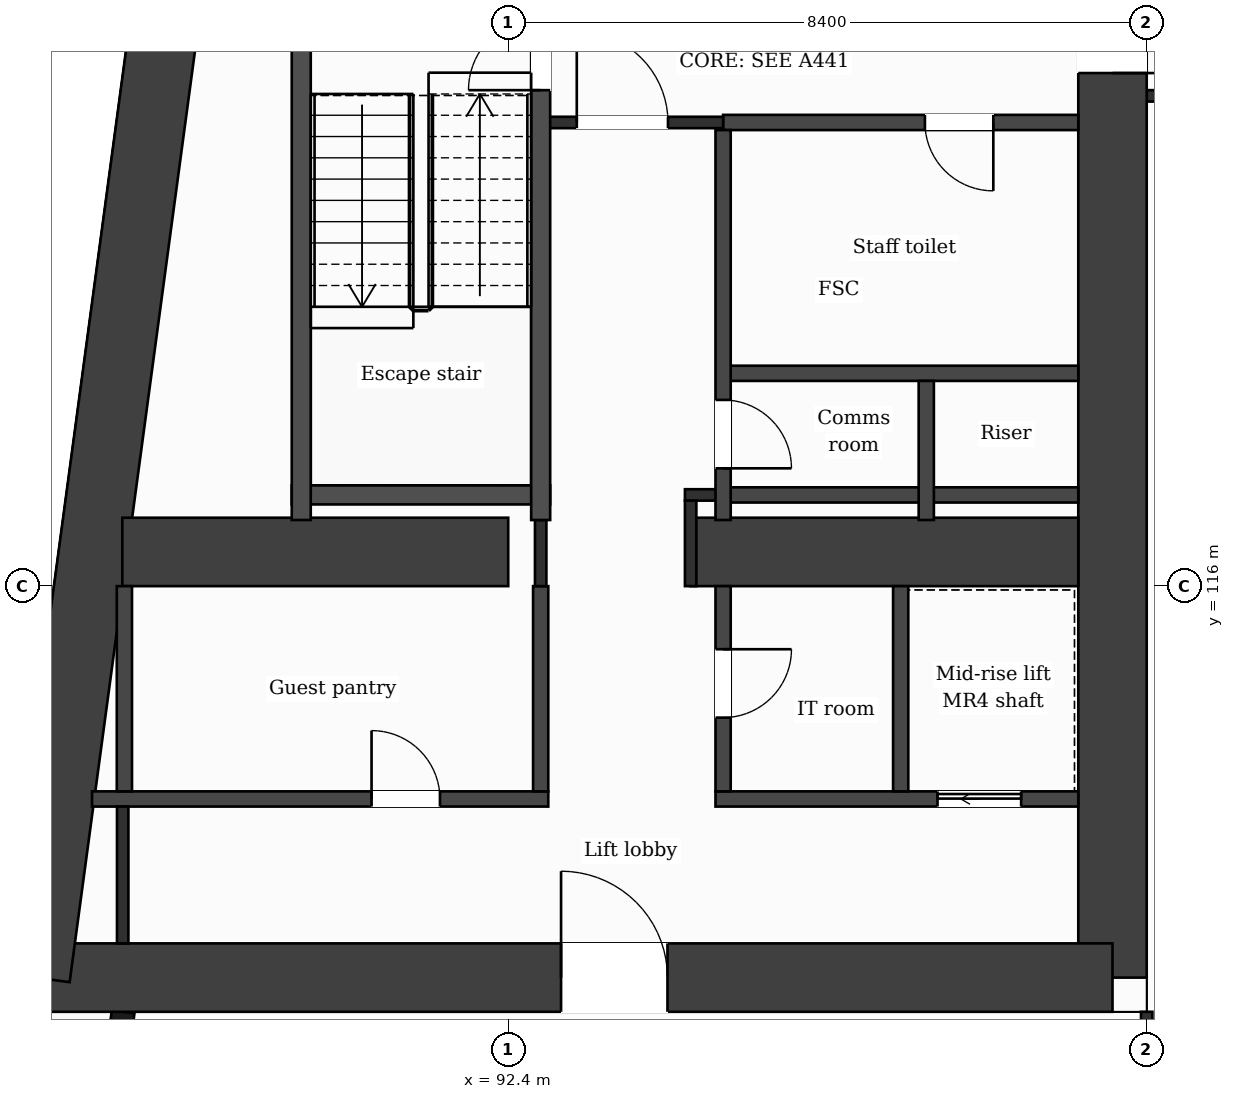
"""IFC4 building model, lengths in metres.
Left out: names, types, materials, properties, quantities, classifications, styles, units other than length and angle.
Written with IfcOpenShell. Run it as: python <this file> out.ifc"""

import sys

from ifc_helpers import new_model, si_unit, direction, frame, frame_2d, origin, place, context, subcontext, project, spatial, rectangle, extrude, element, fill, save


model = new_model("IFC4")
c1 = context("Model", 3, precision=1e-05, world=origin(), true_north=direction((0.0, 1.0)))
c2 = subcontext(c1, "Body", "Model", "MODEL_VIEW")
j1 = project(units=[si_unit("LENGTHUNIT", "METRE"), si_unit("PLANEANGLEUNIT", "RADIAN")], contexts=[c1])
p1 = place(None, origin())
s1 = spatial("IfcSite", under=j1, at=p1, CompositionType="ELEMENT")
p2 = place(p1, origin())
s2 = spatial("IfcBuilding", under=s1, at=p2, CompositionType="ELEMENT")
p3 = place(p2, frame((0.0, 0.0, 170.0)))
s3 = spatial("IfcBuildingStorey", under=s2, at=p3, CompositionType="ELEMENT", Elevation=170.0)
p4 = place(p3, frame((100.35, 131.95, 0.0), z_axis=(0.0, 0.0, 1.0), x_axis=(0.0, -1.0, 0.0)))
e1 = element("IfcWall", 1, at=p4, inside=s3, PredefinedType="SHEAR", context=c2, shape_type="SweptSolid", body=[
    extrude(rectangle(XDim=21.1, YDim=0.9, at=frame_2d((10.55, 0.0))), origin(), (0.0, 0.0, 1.0), 3.7),
])
p5 = place(p4, frame((7.8, 0.0, 0.0)))
e2 = element("IfcOpeningElement", 2, at=p5, cuts=e1, PredefinedType="OPENING", context=c2, shape_type="SweptSolid", body=[
    extrude(rectangle(XDim=1.4, YDim=2.1, at=frame_2d((0.7, 1.05))), frame((0.0, 0.46, 0.0), z_axis=(0.0, -1.0, 0.0), x_axis=(1.0, 0.0, 0.0)), (0.0, 0.0, 1.0), 0.92),
])
p6 = place(p3, frame((100.35, 110.85, 0.0), z_axis=(0.0, 0.0, 1.0), x_axis=(-1.0, 0.0, 0.0)))
e3 = element("IfcWall", 3, at=p6, inside=s3, PredefinedType="SHEAR", context=c2, shape_type="SweptSolid", body=[
    extrude(rectangle(XDim=14.166, YDim=0.9, at=frame_2d((7.083, 0.0))), origin(), (0.0, 0.0, 1.0), 3.7),
])
p7 = place(p6, frame((5.855, 0.0, 0.0)))
e4 = element("IfcOpeningElement", 4, at=p7, cuts=e3, PredefinedType="OPENING", context=c2, shape_type="SweptSolid", body=[
    extrude(rectangle(XDim=1.4, YDim=2.1, at=frame_2d((0.7, 1.05))), frame((0.0, 0.46, 0.0), z_axis=(0.0, -1.0, 0.0), x_axis=(1.0, 0.0, 0.0)), (0.0, 0.0, 1.0), 0.92),
])
p8 = place(p3, frame((86.184, 110.85, 0.0), z_axis=(0.0, 0.0, 1.0), x_axis=(0.133410495943, 0.991060865725, 0.0)))
e5 = element("IfcWall", 5, at=p8, inside=s3, PredefinedType="SHEAR", context=c2, shape_type="SweptSolid", body=[
    extrude(rectangle(XDim=21.29, YDim=0.9, at=frame_2d((10.645, 0.0))), origin(), (0.0, 0.0, 1.0), 3.7),
])
p9 = place(p3, frame((87.323, 116.45, 0.0), z_axis=(0.0, 0.0, 1.0), x_axis=(1.0, 0.0, 0.0)))
e6 = element("IfcWall", 6, at=p9, inside=s3, PredefinedType="SHEAR", context=c2, shape_type="SweptSolid", body=[
    extrude(rectangle(XDim=5.077, YDim=0.9, at=frame_2d((2.539, 0.0))), origin(), (0.0, 0.0, 1.0), 3.7),
])
p10 = place(p3, frame((94.8, 116.45, 0.0), z_axis=(0.0, 0.0, 1.0), x_axis=(1.0, 0.0, 0.0)))
e7 = element("IfcWall", 7, at=p10, inside=s3, PredefinedType="SHEAR", context=c2, shape_type="SweptSolid", body=[
    extrude(rectangle(XDim=5.1, YDim=0.9, at=frame_2d((2.55, 0.0))), origin(), (0.0, 0.0, 1.0), 3.7),
])
p11 = place(p3, frame((87.334, 110.4, 0.0), z_axis=(0.0, 0.0, 1.0), x_axis=(-0.133437175554, -0.991057273915, 0.0)))
e8 = element("IfcWall", 8, at=p11, inside=s3, PredefinedType="SOLIDWALL", context=c2, shape_type="SweptSolid", body=[
    extrude(rectangle(XDim=6.781, YDim=0.3, at=frame_2d((3.39, 0.0))), origin(), (0.0, 0.0, 1.0), 3.38),
])
p12 = place(p11, frame((1.418, 0.0, 0.0)))
e9 = element("IfcOpeningElement", 9, at=p12, cuts=e8, PredefinedType="OPENING", context=c2, shape_type="SweptSolid", body=[
    extrude(rectangle(XDim=1.2, YDim=2.4, at=frame_2d((0.6, 1.2))), frame((0.0, 0.16, 0.0), z_axis=(0.0, -1.0, 0.0), x_axis=(1.0, 0.0, 0.0)), (0.0, 0.0, 1.0), 0.32),
])
p13 = place(p11, frame((4.758, 0.0, 0.9)))
e10 = element("IfcOpeningElement", 10, at=p13, cuts=e8, PredefinedType="OPENING", context=c2, shape_type="SweptSolid", body=[
    extrude(rectangle(XDim=1.2, YDim=2.1, at=frame_2d((0.6, 1.05))), frame((0.0, 0.16, 0.0), z_axis=(0.0, -1.0, 0.0), x_axis=(1.0, 0.0, 0.0)), (0.0, 0.0, 1.0), 0.32),
])
p14 = place(p3, frame((86.924, 113.2, 0.0), z_axis=(0.0, 0.0, 1.0), x_axis=(1.0, 0.0, 0.0)))
e11 = element("IfcWall", 11, at=p14, inside=s3, PredefinedType="PARTITIONING", context=c2, shape_type="SweptSolid", body=[
    extrude(rectangle(XDim=6.003, YDim=0.2, at=frame_2d((3.001, 0.0))), origin(), (0.0, 0.0, 1.0), 3.38),
])
p15 = place(p14, frame((3.678, 0.0, 0.0)))
e12 = element("IfcOpeningElement", 12, at=p15, cuts=e11, PredefinedType="OPENING", context=c2, shape_type="SweptSolid", body=[
    extrude(rectangle(XDim=0.9, YDim=2.1, at=frame_2d((0.45, 1.05))), frame((0.0, 0.11, 0.0), z_axis=(0.0, -1.0, 0.0), x_axis=(1.0, 0.0, 0.0)), (0.0, 0.0, 1.0), 0.22),
])
p16 = place(p3, frame((95.127, 113.2, 0.0), z_axis=(0.0, 0.0, 1.0), x_axis=(1.0, 0.0, 0.0)))
e13 = element("IfcWall", 13, at=p16, inside=s3, PredefinedType="PARTITIONING", context=c2, shape_type="SweptSolid", body=[
    extrude(rectangle(XDim=4.773, YDim=0.2, at=frame_2d((2.386, 0.0))), origin(), (0.0, 0.0, 1.0), 3.38),
])
p17 = place(p16, frame((2.921, 0.0, 0.0)))
e14 = element("IfcOpeningElement", 14, at=p17, cuts=e13, PredefinedType="OPENING", context=c2, shape_type="SweptSolid", body=[
    extrude(rectangle(XDim=1.1, YDim=2.1, at=frame_2d((0.55, 1.05))), frame((0.0, 0.11, 0.0), z_axis=(0.0, -1.0, 0.0), x_axis=(1.0, 0.0, 0.0)), (0.0, 0.0, 1.0), 0.22),
])
p18 = place(p3, frame((95.227, 117.2, 0.0), z_axis=(0.0, 0.0, 1.0), x_axis=(1.0, 0.0, 0.0)))
e15 = element("IfcWall", 15, at=p18, inside=s3, PredefinedType="PARTITIONING", context=c2, shape_type="SweptSolid", body=[
    extrude(rectangle(XDim=4.673, YDim=0.2, at=frame_2d((2.336, 0.0))), origin(), (0.0, 0.0, 1.0), 3.38),
])
p19 = place(p3, frame((94.725, 117.2, 0.0), z_axis=(0.0, 0.0, 1.0), x_axis=(1.0, 0.0, 0.0)))
e16 = element("IfcWall", 16, at=p19, inside=s3, PredefinedType="PARTITIONING", context=c2, shape_type="SweptSolid", body=[
    extrude(rectangle(XDim=0.502, YDim=0.15, at=frame_2d((0.251, 0.0))), origin(), (0.0, 0.0, 1.0), 3.38),
])
p20 = place(p3, frame((89.552, 117.2, 0.0), z_axis=(0.0, 0.0, 1.0), x_axis=(1.0, 0.0, 0.0)))
e17 = element("IfcWall", 17, at=p20, inside=s3, PredefinedType="PARTITIONING", context=c2, shape_type="SweptSolid", body=[
    extrude(rectangle(XDim=3.4, YDim=0.25, at=frame_2d((1.7, 0.0))), origin(), (0.0, 0.0, 1.0), 3.38),
])
p21 = place(p3, frame((95.227, 118.8, 0.0), z_axis=(0.0, 0.0, 1.0), x_axis=(1.0, 0.0, 0.0)))
e18 = element("IfcWall", 18, at=p21, inside=s3, PredefinedType="PARTITIONING", context=c2, shape_type="SweptSolid", body=[
    extrude(rectangle(XDim=4.673, YDim=0.2, at=frame_2d((2.336, 0.0))), origin(), (0.0, 0.0, 1.0), 3.38),
])
p22 = place(p3, frame((95.227, 122.1, 0.0), z_axis=(0.0, 0.0, 1.0), x_axis=(1.0, 0.0, 0.0)))
e19 = element("IfcWall", 19, at=p22, inside=s3, PredefinedType="PARTITIONING", context=c2, shape_type="SweptSolid", body=[
    extrude(rectangle(XDim=4.673, YDim=0.2, at=frame_2d((2.336, 0.0))), origin(), (0.0, 0.0, 1.0), 3.38),
])
p23 = place(p22, frame((2.655, 0.0, 0.0)))
e20 = element("IfcOpeningElement", 20, at=p23, cuts=e19, PredefinedType="OPENING", context=c2, shape_type="SweptSolid", body=[
    extrude(rectangle(XDim=0.9, YDim=2.1, at=frame_2d((0.45, 1.05))), frame((0.0, 0.11, 0.0), z_axis=(0.0, -1.0, 0.0), x_axis=(1.0, 0.0, 0.0)), (0.0, 0.0, 1.0), 0.22),
])
p24 = place(p3, frame((92.827, 122.1, 0.0), z_axis=(0.0, 0.0, 1.0), x_axis=(1.0, 0.0, 0.0)))
e21 = element("IfcWall", 21, at=p24, inside=s3, PredefinedType="PARTITIONING", context=c2, shape_type="SweptSolid", body=[
    extrude(rectangle(XDim=2.4, YDim=0.15, at=frame_2d((1.2, 0.0))), origin(), (0.0, 0.0, 1.0), 3.38),
])
p25 = place(p24, frame((0.475, 0.0, 0.0)))
e22 = element("IfcOpeningElement", 22, at=p25, cuts=e21, PredefinedType="OPENING", context=c2, shape_type="SweptSolid", body=[
    extrude(rectangle(XDim=1.2, YDim=2.1, at=frame_2d((0.6, 1.05))), frame((0.0, 0.085, 0.0), z_axis=(0.0, -1.0, 0.0), x_axis=(1.0, 0.0, 0.0)), (0.0, 0.0, 1.0), 0.17),
])
p26 = place(p3, frame((100.8, 122.45, 0.0), z_axis=(0.0, 0.0, 1.0), x_axis=(1.0, 0.0, 0.0)))
e23 = element("IfcWall", 23, at=p26, inside=s3, PredefinedType="PARTITIONING", context=c2, shape_type="SweptSolid", body=[
    extrude(rectangle(XDim=25.2, YDim=0.15, at=frame_2d((12.6, 0.0))), origin(), (0.0, 0.0, 1.0), 3.38),
])
p27 = place(p3, frame((87.35, 113.3, 0.0), z_axis=(0.0, 0.0, 1.0), x_axis=(0.0, 1.0, 0.0)))
e24 = element("IfcWall", 24, at=p27, inside=s3, PredefinedType="PARTITIONING", context=c2, shape_type="SweptSolid", body=[
    extrude(rectangle(XDim=2.7, YDim=0.2, at=frame_2d((1.35, 0.0))), origin(), (0.0, 0.0, 1.0), 3.38),
])
p28 = place(p3, frame((87.328, 111.3, 0.0), z_axis=(0.0, 0.0, 1.0), x_axis=(0.0, 1.0, 0.0)))
e25 = element("IfcWall", 25, at=p28, inside=s3, PredefinedType="PARTITIONING", context=c2, shape_type="SweptSolid", body=[
    extrude(rectangle(XDim=1.8, YDim=0.15, at=frame_2d((0.9, 0.0))), origin(), (0.0, 0.0, 1.0), 3.38),
])
p29 = place(p3, frame((89.677, 116.87, 0.0), z_axis=(0.0, 0.0, 1.0), x_axis=(0.0, 1.0, 0.0)))
e26 = element("IfcWall", 26, at=p29, inside=s3, PredefinedType="PARTITIONING", context=c2, shape_type="SweptSolid", body=[
    extrude(rectangle(XDim=6.955, YDim=0.25, at=frame_2d((3.478, 0.0))), origin(), (0.0, 0.0, 1.0), 3.38),
])
p30 = place(p3, frame((92.827, 113.3, 0.0), z_axis=(0.0, 0.0, 1.0), x_axis=(0.0, 1.0, 0.0)))
e27 = element("IfcWall", 27, at=p30, inside=s3, PredefinedType="PARTITIONING", context=c2, shape_type="SweptSolid", body=[
    extrude(rectangle(XDim=2.7, YDim=0.2, at=frame_2d((1.35, 0.0))), origin(), (0.0, 0.0, 1.0), 3.38),
])
p31 = place(p3, frame((92.827, 116.0, 0.0), z_axis=(0.0, 0.0, 1.0), x_axis=(0.0, 1.0, 0.0)))
e28 = element("IfcWall", 28, at=p31, inside=s3, PredefinedType="PARTITIONING", context=c2, shape_type="SweptSolid", body=[
    extrude(rectangle(XDim=0.87, YDim=0.15, at=frame_2d((0.435, 0.0))), origin(), (0.0, 0.0, 1.0), 3.38),
])
p32 = place(p3, frame((92.827, 116.87, 0.0), z_axis=(0.0, 0.0, 1.0), x_axis=(0.0, 1.0, 0.0)))
e29 = element("IfcWall", 29, at=p32, inside=s3, PredefinedType="PARTITIONING", context=c2, shape_type="SweptSolid", body=[
    extrude(rectangle(XDim=6.955, YDim=0.25, at=frame_2d((3.478, 0.0))), origin(), (0.0, 0.0, 1.0), 3.38),
])
p33 = place(p32, frame((5.655, 0.0, 0.0)))
e30 = element("IfcOpeningElement", 30, at=p33, cuts=e29, PredefinedType="OPENING", context=c2, shape_type="SweptSolid", body=[
    extrude(rectangle(XDim=0.95, YDim=2.1, at=frame_2d((0.475, 1.05))), frame((0.0, 0.135, 0.0), z_axis=(0.0, -1.0, 0.0), x_axis=(1.0, 0.0, 0.0)), (0.0, 0.0, 1.0), 0.27),
])
p34 = place(p3, frame((94.8, 116.0, 0.0), z_axis=(0.0, 0.0, 1.0), x_axis=(0.0, 1.0, 0.0)))
e31 = element("IfcWall", 31, at=p34, inside=s3, PredefinedType="PARTITIONING", context=c2, shape_type="SweptSolid", body=[
    extrude(rectangle(XDim=1.125, YDim=0.15, at=frame_2d((0.562, 0.0))), origin(), (0.0, 0.0, 1.0), 3.38),
])
p35 = place(p3, frame((95.227, 113.3, 0.0), z_axis=(0.0, 0.0, 1.0), x_axis=(0.0, 1.0, 0.0)))
e32 = element("IfcWall", 32, at=p35, inside=s3, PredefinedType="PARTITIONING", context=c2, shape_type="SweptSolid", body=[
    extrude(rectangle(XDim=2.7, YDim=0.2, at=frame_2d((1.35, 0.0))), origin(), (0.0, 0.0, 1.0), 3.38),
])
p36 = place(p35, frame((0.97, 0.0, 0.0)))
e33 = element("IfcOpeningElement", 33, at=p36, cuts=e32, PredefinedType="OPENING", context=c2, shape_type="SweptSolid", body=[
    extrude(rectangle(XDim=0.9, YDim=2.1, at=frame_2d((0.45, 1.05))), frame((0.0, 0.11, 0.0), z_axis=(0.0, -1.0, 0.0), x_axis=(1.0, 0.0, 0.0)), (0.0, 0.0, 1.0), 0.22),
])
p37 = place(p3, frame((95.227, 116.87, 0.0), z_axis=(0.0, 0.0, 1.0), x_axis=(0.0, 1.0, 0.0)))
e34 = element("IfcWall", 34, at=p37, inside=s3, PredefinedType="PARTITIONING", context=c2, shape_type="SweptSolid", body=[
    extrude(rectangle(XDim=5.13, YDim=0.2, at=frame_2d((2.565, 0.0))), origin(), (0.0, 0.0, 1.0), 3.38),
])
p38 = place(p37, frame((0.68, 0.0, 0.0)))
e35 = element("IfcOpeningElement", 35, at=p38, cuts=e34, PredefinedType="OPENING", context=c2, shape_type="SweptSolid", body=[
    extrude(rectangle(XDim=0.9, YDim=2.1, at=frame_2d((0.45, 1.05))), frame((0.0, 0.11, 0.0), z_axis=(0.0, -1.0, 0.0), x_axis=(1.0, 0.0, 0.0)), (0.0, 0.0, 1.0), 0.22),
])
p39 = place(p3, frame((97.563, 113.3, 0.0), z_axis=(0.0, 0.0, 1.0), x_axis=(0.0, 1.0, 0.0)))
e36 = element("IfcWall", 36, at=p39, inside=s3, PredefinedType="PARTITIONING", context=c2, shape_type="SweptSolid", body=[
    extrude(rectangle(XDim=2.7, YDim=0.2, at=frame_2d((1.35, 0.0))), origin(), (0.0, 0.0, 1.0), 3.38),
])
p40 = place(p3, frame((97.9, 116.87, 0.0), z_axis=(0.0, 0.0, 1.0), x_axis=(0.0, 1.0, 0.0)))
e37 = element("IfcWall", 37, at=p40, inside=s3, PredefinedType="PARTITIONING", context=c2, shape_type="SweptSolid", body=[
    extrude(rectangle(XDim=1.83, YDim=0.2, at=frame_2d((0.915, 0.0))), origin(), (0.0, 0.0, 1.0), 3.38),
])
p41 = place(p3, frame((100.8, 109.075, 0.0), z_axis=(0.0, 0.0, 1.0), x_axis=(0.0, 1.0, 0.0)))
e38 = element("IfcWall", 38, at=p41, inside=s3, PredefinedType="PARTITIONING", context=c2, shape_type="SweptSolid", body=[
    extrude(rectangle(XDim=1.325, YDim=0.15, at=frame_2d((0.663, 0.0))), origin(), (0.0, 0.0, 1.0), 3.38),
])
p42 = place(p25, origin())
e39 = element("IfcDoor", 39, at=p42, inside=s3, OperationType="SINGLE_SWING_LEFT", PredefinedType="DOOR", context=c2, shape_type="SweptSolid", body=[
    extrude(rectangle(XDim=1.2, YDim=2.1, at=frame_2d((0.6, 1.05))), frame((0.0, 0.025, 0.0), z_axis=(0.0, -1.0, 0.0), x_axis=(1.0, 0.0, 0.0)), (0.0, 0.0, 1.0), 0.05),
])
fill(e22, e39)
p43 = place(p23, origin())
e40 = element("IfcDoor", 40, at=p43, inside=s3, OperationType="SINGLE_SWING_RIGHT", PredefinedType="DOOR", context=c2, shape_type="SweptSolid", body=[
    extrude(rectangle(XDim=0.9, YDim=2.1, at=frame_2d((0.45, 1.05))), frame((0.0, 0.025, 0.0), z_axis=(0.0, -1.0, 0.0), x_axis=(1.0, 0.0, 0.0)), (0.0, 0.0, 1.0), 0.05),
])
fill(e20, e40)
p44 = place(p33, origin())
e41 = element("IfcDoor", 41, at=p44, inside=s3, OperationType="SINGLE_SWING_LEFT", PredefinedType="DOOR", context=c2, shape_type="SweptSolid", body=[
    extrude(rectangle(XDim=0.95, YDim=2.1, at=frame_2d((0.475, 1.05))), frame((0.0, 0.025, 0.0), z_axis=(0.0, -1.0, 0.0), x_axis=(1.0, 0.0, 0.0)), (0.0, 0.0, 1.0), 0.05),
])
fill(e30, e41)
p45 = place(p38, origin())
e42 = element("IfcDoor", 42, at=p45, inside=s3, OperationType="SINGLE_SWING_LEFT", PredefinedType="DOOR", context=c2, shape_type="SweptSolid", body=[
    extrude(rectangle(XDim=0.9, YDim=2.1, at=frame_2d((0.45, 1.05))), frame((0.0, 0.025, 0.0), z_axis=(0.0, -1.0, 0.0), x_axis=(1.0, 0.0, 0.0)), (0.0, 0.0, 1.0), 0.05),
])
fill(e35, e42)
p46 = place(p17, origin())
e43 = element("IfcDoor", 43, at=p46, inside=s3, OperationType="SLIDING_TO_LEFT", PredefinedType="DOOR", context=c2, shape_type="SweptSolid", body=[
    extrude(rectangle(XDim=1.1, YDim=2.1, at=frame_2d((0.55, 1.05))), frame((0.0, 0.025, 0.0), z_axis=(0.0, -1.0, 0.0), x_axis=(1.0, 0.0, 0.0)), (0.0, 0.0, 1.0), 0.05),
])
fill(e14, e43)
p47 = place(p15, origin())
e44 = element("IfcDoor", 44, at=p47, inside=s3, OperationType="SINGLE_SWING_LEFT", PredefinedType="DOOR", context=c2, shape_type="SweptSolid", body=[
    extrude(rectangle(XDim=0.9, YDim=2.1, at=frame_2d((0.45, 1.05))), frame((0.0, 0.025, 0.0), z_axis=(0.0, -1.0, 0.0), x_axis=(1.0, 0.0, 0.0)), (0.0, 0.0, 1.0), 0.05),
])
fill(e12, e44)
p48 = place(p36, origin())
e45 = element("IfcDoor", 45, at=p48, inside=s3, OperationType="SINGLE_SWING_RIGHT", PredefinedType="DOOR", context=c2, shape_type="SweptSolid", body=[
    extrude(rectangle(XDim=0.9, YDim=2.1, at=frame_2d((0.45, 1.05))), frame((0.0, 0.025, 0.0), z_axis=(0.0, -1.0, 0.0), x_axis=(1.0, 0.0, 0.0)), (0.0, 0.0, 1.0), 0.05),
])
fill(e33, e45)
p49 = place(p7, origin())
e46 = element("IfcDoor", 46, at=p49, inside=s3, OperationType="SINGLE_SWING_RIGHT", PredefinedType="DOOR", context=c2, shape_type="SweptSolid", body=[
    extrude(rectangle(XDim=1.4, YDim=2.1, at=frame_2d((0.7, 1.05))), frame((0.0, 0.025, 0.0), z_axis=(0.0, -1.0, 0.0), x_axis=(1.0, 0.0, 0.0)), (0.0, 0.0, 1.0), 0.05),
])
fill(e4, e46)
p50 = place(p5, origin())
e47 = element("IfcDoor", 47, at=p50, inside=s3, OperationType="SINGLE_SWING_RIGHT", PredefinedType="DOOR", context=c2, shape_type="SweptSolid", body=[
    extrude(rectangle(XDim=1.4, YDim=2.1, at=frame_2d((0.7, 1.05))), frame((0.0, 0.025, 0.0), z_axis=(0.0, -1.0, 0.0), x_axis=(1.0, 0.0, 0.0)), (0.0, 0.0, 1.0), 0.05),
])
fill(e2, e47)
save(model, sys.argv[1])
